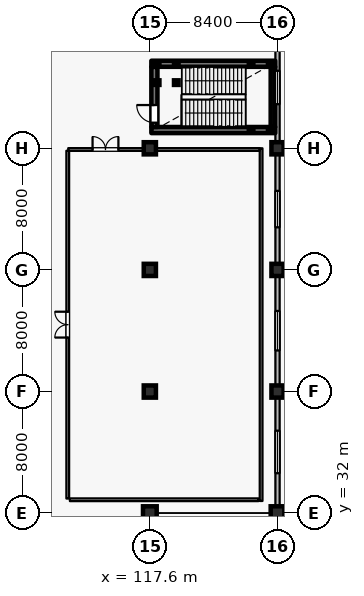
"""IFC4 building model, lengths in metres.
Left out: names, types, materials, properties, quantities, classifications, styles, units other than length and angle.
Written with IfcOpenShell. Run it as: python <this file> out.ifc"""

import sys

from ifc_helpers import new_model, si_unit, direction, frame, frame_2d, origin, origin_2d, place, context, subcontext, project, spatial, rectangle, hollow_rectangle, circle, extrude, element, fill, save


model = new_model("IFC4")
c1 = context("Model", 3, precision=1e-05, world=origin(), true_north=direction((0.0, 1.0)))
c2 = subcontext(c1, "Body", "Model", "MODEL_VIEW")
j1 = project(units=[si_unit("LENGTHUNIT", "METRE"), si_unit("PLANEANGLEUNIT", "RADIAN")], contexts=[c1])
p1 = place(None, origin())
s1 = spatial("IfcSite", under=j1, at=p1, CompositionType="ELEMENT")
p2 = place(p1, origin())
s2 = spatial("IfcBuilding", under=s1, at=p2, CompositionType="ELEMENT")
p3 = place(p2, origin())
s3 = spatial("IfcBuildingStorey", under=s2, at=p3, CompositionType="ELEMENT", Elevation=0.0)
p4 = place(p3, frame((117.6, 32.0, 0.0), z_axis=(0.0, 0.0, 1.0), x_axis=(1.0, 0.0, 0.0)))
e1 = element("IfcColumn", 1, at=p4, inside=s3, PredefinedType="COLUMN", context=c2, shape_type="SweptSolid", body=[
    extrude(circle(Radius=0.45, at=origin_2d()), origin(), (0.0, 0.0, 1.0), 6.0),
])
for number, where, z_axis, x_axis in (
    (2, (117.6, 40.0, 0.0), (0.0, 0.0, 1.0), (1.0, 0.0, 0.0)),
    (3, (117.6, 48.0, 0.0), (0.0, 0.0, 1.0), (1.0, 0.0, 0.0)),
    (4, (117.6, 56.0, 0.0), (0.0, 0.0, 1.0), (1.0, 0.0, 0.0)),
):
    element("IfcColumn", number, at=place(p3, frame(where, z_axis=z_axis, x_axis=x_axis)), inside=s3, PredefinedType="COLUMN", context=c2, shape_type="SweptSolid", body=[
        extrude(rectangle(XDim=0.8, YDim=0.8, at=origin_2d()), origin(), (0.0, 0.0, 1.0), 6.0),
    ])
p5 = place(p3, frame((126.0, 32.0, 0.0), z_axis=(0.0, 0.0, 1.0), x_axis=(1.0, 0.0, 0.0)))
e5 = element("IfcColumn", 5, at=p5, inside=s3, PredefinedType="COLUMN", context=c2, shape_type="SweptSolid", body=[
    extrude(circle(Radius=0.45, at=origin_2d()), origin(), (0.0, 0.0, 1.0), 6.0),
])
for number, where, z_axis, x_axis in (
    (6, (126.0, 40.0, 0.0), (0.0, 0.0, 1.0), (1.0, 0.0, 0.0)),
    (7, (126.0, 48.0, 0.0), (0.0, 0.0, 1.0), (1.0, 0.0, 0.0)),
    (8, (126.0, 56.0, 0.0), (0.0, 0.0, 1.0), (1.0, 0.0, 0.0)),
):
    element("IfcColumn", number, at=place(p3, frame(where, z_axis=z_axis, x_axis=x_axis)), inside=s3, PredefinedType="COLUMN", context=c2, shape_type="SweptSolid", body=[
        extrude(rectangle(XDim=0.8, YDim=0.8, at=origin_2d()), origin(), (0.0, 0.0, 1.0), 6.0),
    ])
p6 = place(p3, frame((126.0, 63.6, 0.0), z_axis=(0.0, 0.0, 1.0), x_axis=(0.0, -1.0, 0.0)))
e9 = element("IfcWall", 9, at=p6, inside=s3, PredefinedType="SOLIDWALL", context=c2, shape_type="SweptSolid", body=[
    extrude(rectangle(XDim=7.2, YDim=0.28, at=frame_2d((3.6, 0.0))), origin(), (0.0, 0.0, 1.0), 5.7),
])
p7 = place(p6, frame((2.5, 0.0, 1.0)))
e10 = element("IfcOpeningElement", 10, at=p7, cuts=e9, PredefinedType="OPENING", context=c2, shape_type="SweptSolid", body=[
    extrude(rectangle(XDim=2.2, YDim=1.75, at=frame_2d((1.1, 0.875))), frame((0.0, 0.15, 0.0), z_axis=(0.0, -1.0, 0.0), x_axis=(1.0, 0.0, 0.0)), (0.0, 0.0, 1.0), 0.3),
])
p8 = place(p3, frame((126.0, 55.6, 0.0), z_axis=(0.0, 0.0, 1.0), x_axis=(0.0, -1.0, 0.0)))
e11 = element("IfcWall", 11, at=p8, inside=s3, PredefinedType="SOLIDWALL", context=c2, shape_type="SweptSolid", body=[
    extrude(rectangle(XDim=7.2, YDim=0.28, at=frame_2d((3.6, 0.0))), origin(), (0.0, 0.0, 1.0), 5.0),
])
p9 = place(p8, frame((2.4, 0.0, 1.0)))
e12 = element("IfcOpeningElement", 12, at=p9, cuts=e11, PredefinedType="OPENING", context=c2, shape_type="SweptSolid", body=[
    extrude(rectangle(XDim=2.4, YDim=1.65, at=frame_2d((1.2, 0.825))), frame((0.0, 0.15, 0.0), z_axis=(0.0, -1.0, 0.0), x_axis=(1.0, 0.0, 0.0)), (0.0, 0.0, 1.0), 0.3),
])
p10 = place(p3, frame((126.0, 47.6, 0.0), z_axis=(0.0, 0.0, 1.0), x_axis=(0.0, -1.0, 0.0)))
e13 = element("IfcWall", 13, at=p10, inside=s3, PredefinedType="SOLIDWALL", context=c2, shape_type="SweptSolid", body=[
    extrude(rectangle(XDim=7.2, YDim=0.28, at=frame_2d((3.6, 0.0))), origin(), (0.0, 0.0, 1.0), 5.0),
])
p11 = place(p10, frame((2.3, 0.0, 1.0)))
e14 = element("IfcOpeningElement", 14, at=p11, cuts=e13, PredefinedType="OPENING", context=c2, shape_type="SweptSolid", body=[
    extrude(rectangle(XDim=2.6, YDim=1.85, at=frame_2d((1.3, 0.925))), frame((0.0, 0.15, 0.0), z_axis=(0.0, -1.0, 0.0), x_axis=(1.0, 0.0, 0.0)), (0.0, 0.0, 1.0), 0.3),
])
p12 = place(p3, frame((126.0, 39.6, 0.0), z_axis=(0.0, 0.0, 1.0), x_axis=(0.0, -1.0, 0.0)))
e15 = element("IfcWall", 15, at=p12, inside=s3, PredefinedType="SOLIDWALL", context=c2, shape_type="SweptSolid", body=[
    extrude(rectangle(XDim=7.15, YDim=0.28, at=frame_2d((3.575, 0.0))), origin(), (0.0, 0.0, 1.0), 5.7),
])
p13 = place(p12, frame((2.175, 0.0, 1.0)))
e16 = element("IfcOpeningElement", 16, at=p13, cuts=e15, PredefinedType="OPENING", context=c2, shape_type="SweptSolid", body=[
    extrude(rectangle(XDim=2.8, YDim=1.95, at=frame_2d((1.4, 0.975))), frame((0.0, 0.15, 0.0), z_axis=(0.0, -1.0, 0.0), x_axis=(1.0, 0.0, 0.0)), (0.0, 0.0, 1.0), 0.3),
])
p14 = place(p3, frame((117.7, 57.2, 0.0), z_axis=(0.0, 0.0, 1.0), x_axis=(1.0, 0.0, 0.0)))
e17 = element("IfcWall", 17, at=p14, inside=s3, PredefinedType="SHEAR", context=c2, shape_type="SweptSolid", body=[
    extrude(rectangle(XDim=8.15, YDim=0.4, at=frame_2d((4.075, 0.0))), origin(), (0.0, 0.0, 1.0), 5.675),
])
p15 = place(p3, frame((125.7, 57.405, 0.0), z_axis=(0.0, 0.0, 1.0), x_axis=(0.0, 1.0, 0.0)))
e18 = element("IfcWall", 18, at=p15, inside=s3, PredefinedType="SHEAR", context=c2, shape_type="SweptSolid", body=[
    extrude(rectangle(XDim=3.95, YDim=0.3, at=frame_2d((1.975, 0.0))), origin(), (0.0, 0.0, 1.0), 5.675),
])
p16 = place(p3, frame((117.7, 61.56, 0.0), z_axis=(0.0, 0.0, 1.0), x_axis=(1.0, 0.0, 0.0)))
e19 = element("IfcWall", 19, at=p16, inside=s3, PredefinedType="SHEAR", context=c2, shape_type="SweptSolid", body=[
    extrude(rectangle(XDim=8.15, YDim=0.4, at=frame_2d((4.075, 0.0))), origin(), (0.0, 0.0, 1.0), 5.675),
])
p17 = place(p3, frame((117.9, 57.405, 0.0), z_axis=(0.0, 0.0, 1.0), x_axis=(0.0, 1.0, 0.0)))
e20 = element("IfcWall", 20, at=p17, inside=s3, PredefinedType="SHEAR", context=c2, shape_type="SweptSolid", body=[
    extrude(rectangle(XDim=3.95, YDim=0.4, at=frame_2d((1.975, 0.0))), origin(), (0.0, 0.0, 1.0), 5.675),
])
p18 = place(p17, frame((0.28, 0.0, 0.0)))
e21 = element("IfcOpeningElement", 21, at=p18, cuts=e20, PredefinedType="OPENING", context=c2, shape_type="SweptSolid", body=[
    extrude(rectangle(XDim=1.16, YDim=2.2, at=frame_2d((0.58, 1.1))), frame((0.0, 0.21, 0.0), z_axis=(0.0, -1.0, 0.0), x_axis=(1.0, 0.0, 0.0)), (0.0, 0.0, 1.0), 0.42),
])
for number, where, z_axis, x_axis in (
    (22, (118.08, 60.32, 0.0), (0.0, 0.0, 1.0), (1.0, 0.0, 0.0)),
    (23, (118.08, 61.56, 0.0), (0.0, 0.0, 1.0), (1.0, 0.0, 0.0)),
    (24, (119.34, 60.32, 0.0), (0.0, 0.0, 1.0), (1.0, 0.0, 0.0)),
    (25, (119.34, 61.56, 0.0), (0.0, 0.0, 1.0), (1.0, 0.0, 0.0)),
):
    element("IfcColumn", number, at=place(p3, frame(where, z_axis=z_axis, x_axis=x_axis)), inside=s3, PredefinedType="COLUMN", context=c2, shape_type="SweptSolid", body=[
        extrude(hollow_rectangle(XDim=0.3, YDim=0.3, WallThickness=0.012, at=origin_2d()), origin(), (0.0, 0.0, 1.0), 5.82),
    ])
for number, where, z_axis, x_axis in (
    (26, (124.26, 57.2, -2.7), (0.0, 0.0, 1.0), (1.0, 0.0, 0.0)),
    (27, (124.26, 61.56, -2.7), (0.0, 0.0, 1.0), (1.0, 0.0, 0.0)),
    (28, (125.52, 57.2, -2.7), (0.0, 0.0, 1.0), (1.0, 0.0, 0.0)),
    (29, (125.52, 61.56, -2.7), (0.0, 0.0, 1.0), (1.0, 0.0, 0.0)),
):
    element("IfcColumn", number, at=place(p3, frame(where, z_axis=z_axis, x_axis=x_axis)), inside=s3, PredefinedType="COLUMN", context=c2, shape_type="SweptSolid", body=[
        extrude(hollow_rectangle(XDim=0.3, YDim=0.3, WallThickness=0.012, at=origin_2d()), origin(), (0.0, 0.0, 1.0), 5.52),
    ])
p19 = place(p3, frame((112.2, 32.96, 0.0), z_axis=(0.0, 0.0, 1.0), x_axis=(0.0, 1.0, 0.0)))
e30 = element("IfcWall", 30, at=p19, inside=s3, PredefinedType="PARTITIONING", context=c2, shape_type="SweptSolid", body=[
    extrude(rectangle(XDim=22.88, YDim=0.18, at=frame_2d((11.44, 0.0))), origin(), (0.0, 0.0, 1.0), 5.675),
])
p20 = place(p19, frame((10.59, 0.0, 0.0)))
e31 = element("IfcOpeningElement", 31, at=p20, cuts=e30, PredefinedType="OPENING", context=c2, shape_type="SweptSolid", body=[
    extrude(rectangle(XDim=1.7, YDim=2.3, at=frame_2d((0.85, 1.15))), frame((0.0, 0.1, 0.0), z_axis=(0.0, -1.0, 0.0), x_axis=(1.0, 0.0, 0.0)), (0.0, 0.0, 1.0), 0.2),
])
p21 = place(p3, frame((112.34, 32.88, 0.0), z_axis=(0.0, 0.0, 1.0), x_axis=(1.0, 0.0, 0.0)))
e32 = element("IfcWall", 32, at=p21, inside=s3, PredefinedType="PARTITIONING", context=c2, shape_type="SweptSolid", body=[
    extrude(rectangle(XDim=12.41, YDim=0.18, at=frame_2d((6.205, 0.0))), origin(), (0.0, 0.0, 1.0), 5.675),
])
p22 = place(p3, frame((124.92, 32.8, 0.0), z_axis=(0.0, 0.0, 1.0), x_axis=(0.0, 1.0, 0.0)))
e33 = element("IfcWall", 33, at=p22, inside=s3, PredefinedType="PARTITIONING", context=c2, shape_type="SweptSolid", body=[
    extrude(rectangle(XDim=23.2, YDim=0.18, at=frame_2d((11.6, 0.0))), origin(), (0.0, 0.0, 1.0), 5.675),
])
p23 = place(p3, frame((112.232, 55.92, 0.0), z_axis=(0.0, 0.0, 1.0), x_axis=(1.0, 0.0, 0.0)))
e34 = element("IfcWall", 34, at=p23, inside=s3, PredefinedType="PARTITIONING", context=c2, shape_type="SweptSolid", body=[
    extrude(rectangle(XDim=4.968, YDim=0.18, at=frame_2d((2.484, 0.0))), origin(), (0.0, 0.0, 1.0), 5.0),
])
p24 = place(p23, frame((1.6, 0.0, 0.0)))
e35 = element("IfcOpeningElement", 35, at=p24, cuts=e34, PredefinedType="OPENING", context=c2, shape_type="SweptSolid", body=[
    extrude(rectangle(XDim=1.7, YDim=2.3, at=frame_2d((0.85, 1.15))), frame((0.0, 0.1, 0.0), z_axis=(0.0, -1.0, 0.0), x_axis=(1.0, 0.0, 0.0)), (0.0, 0.0, 1.0), 0.2),
])
p25 = place(p3, frame((118.0, 55.92, 0.0), z_axis=(0.0, 0.0, 1.0), x_axis=(1.0, 0.0, 0.0)))
e36 = element("IfcWall", 36, at=p25, inside=s3, PredefinedType="PARTITIONING", context=c2, shape_type="SweptSolid", body=[
    extrude(rectangle(XDim=6.83, YDim=0.18, at=frame_2d((3.415, 0.0))), origin(), (0.0, 0.0, 1.0), 5.0),
])
p26 = place(p7, origin())
e37 = element("IfcWindow", 37, at=p26, inside=s3, PartitioningType="DOUBLE_PANEL_VERTICAL", PredefinedType="WINDOW", context=c2, shape_type="SweptSolid", body=[
    extrude(rectangle(XDim=2.2, YDim=1.75, at=frame_2d((1.1, 0.875))), frame((0.0, 0.03, 0.0), z_axis=(0.0, -1.0, 0.0), x_axis=(1.0, 0.0, 0.0)), (0.0, 0.0, 1.0), 0.06),
])
fill(e10, e37)
p27 = place(p9, origin())
e38 = element("IfcWindow", 38, at=p27, inside=s3, PartitioningType="DOUBLE_PANEL_VERTICAL", PredefinedType="WINDOW", context=c2, shape_type="SweptSolid", body=[
    extrude(rectangle(XDim=2.4, YDim=1.65, at=frame_2d((1.2, 0.825))), frame((0.0, 0.03, 0.0), z_axis=(0.0, -1.0, 0.0), x_axis=(1.0, 0.0, 0.0)), (0.0, 0.0, 1.0), 0.06),
])
fill(e12, e38)
p28 = place(p11, origin())
e39 = element("IfcWindow", 39, at=p28, inside=s3, PartitioningType="DOUBLE_PANEL_VERTICAL", PredefinedType="WINDOW", context=c2, shape_type="SweptSolid", body=[
    extrude(rectangle(XDim=2.6, YDim=1.85, at=frame_2d((1.3, 0.925))), frame((0.0, 0.03, 0.0), z_axis=(0.0, -1.0, 0.0), x_axis=(1.0, 0.0, 0.0)), (0.0, 0.0, 1.0), 0.06),
])
fill(e14, e39)
p29 = place(p13, origin())
e40 = element("IfcWindow", 40, at=p29, inside=s3, PartitioningType="DOUBLE_PANEL_VERTICAL", PredefinedType="WINDOW", context=c2, shape_type="SweptSolid", body=[
    extrude(rectangle(XDim=2.8, YDim=1.95, at=frame_2d((1.4, 0.975))), frame((0.0, 0.03, 0.0), z_axis=(0.0, -1.0, 0.0), x_axis=(1.0, 0.0, 0.0)), (0.0, 0.0, 1.0), 0.06),
])
fill(e16, e40)
p30 = place(p18, origin())
e41 = element("IfcDoor", 41, at=p30, inside=s3, OperationType="SINGLE_SWING_RIGHT", PredefinedType="DOOR", context=c2, shape_type="SweptSolid", body=[
    extrude(rectangle(XDim=1.16, YDim=2.2, at=frame_2d((0.58, 1.1))), frame((0.0, 0.025, 0.0), z_axis=(0.0, -1.0, 0.0), x_axis=(1.0, 0.0, 0.0)), (0.0, 0.0, 1.0), 0.05),
])
fill(e21, e41)
p31 = place(p20, origin())
e42 = element("IfcDoor", 42, at=p31, inside=s3, OperationType="DOUBLE_DOOR_SINGLE_SWING", PredefinedType="DOOR", context=c2, shape_type="SweptSolid", body=[
    extrude(rectangle(XDim=1.7, YDim=2.3, at=frame_2d((0.85, 1.15))), frame((0.0, 0.025, 0.0), z_axis=(0.0, -1.0, 0.0), x_axis=(1.0, 0.0, 0.0)), (0.0, 0.0, 1.0), 0.05),
])
fill(e31, e42)
p32 = place(p24, origin())
e43 = element("IfcDoor", 43, at=p32, inside=s3, OperationType="DOUBLE_DOOR_SINGLE_SWING", PredefinedType="DOOR", context=c2, shape_type="SweptSolid", body=[
    extrude(rectangle(XDim=1.7, YDim=2.3, at=frame_2d((0.85, 1.15))), frame((0.0, 0.025, 0.0), z_axis=(0.0, -1.0, 0.0), x_axis=(1.0, 0.0, 0.0)), (0.0, 0.0, 1.0), 0.05),
])
fill(e35, e43)
save(model, sys.argv[1])
